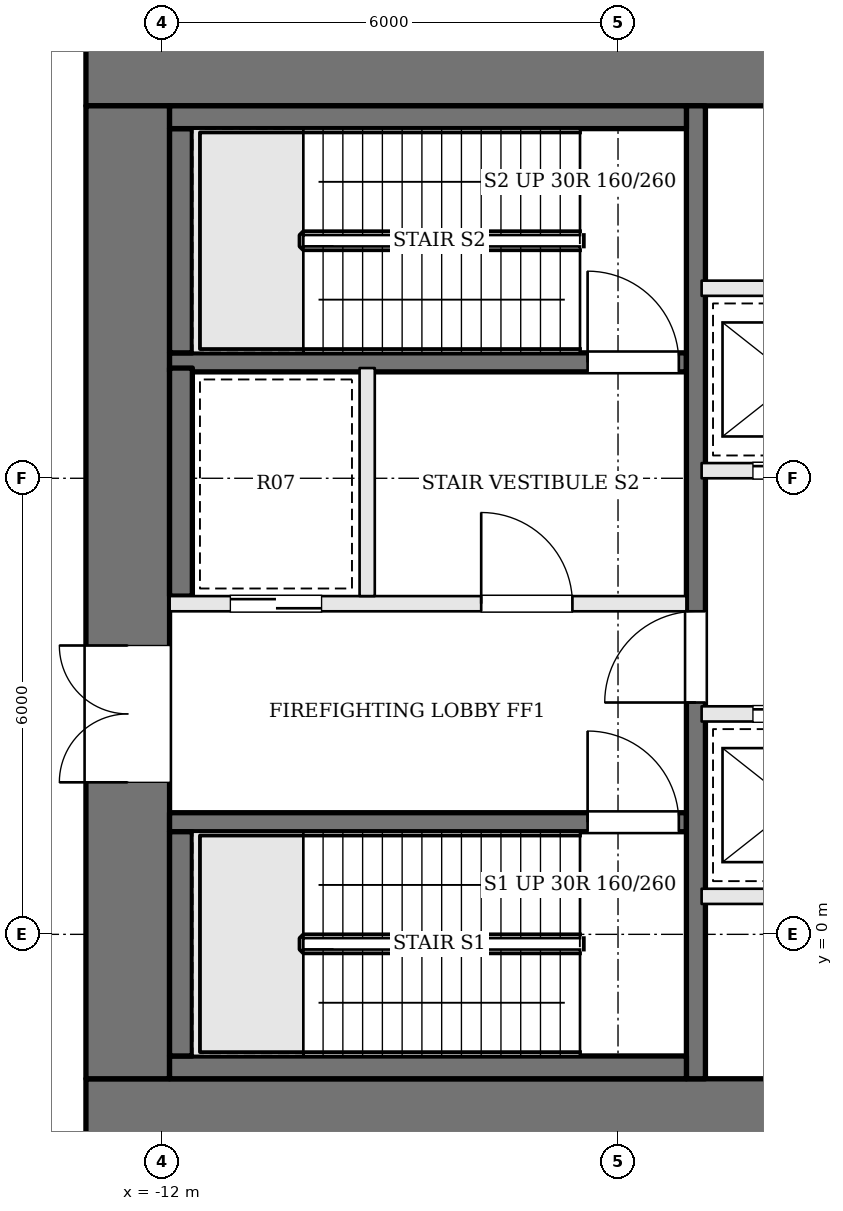
"""IFC4 building model, lengths in metres.
Left out: names, types, materials, properties, quantities, classifications, styles, units other than length and angle.
Written with IfcOpenShell. Run it as: python <this file> out.ifc"""

import sys

from ifc_helpers import new_model, si_unit, direction, frame, frame_2d, origin, place, context, subcontext, project, spatial, rectangle, extrude, element, fill, save


model = new_model("IFC4")
c1 = context("Model", 3, precision=1e-05, world=origin(), true_north=direction((0.0, 1.0)))
c2 = subcontext(c1, "Body", "Model", "MODEL_VIEW")
j1 = project(units=[si_unit("LENGTHUNIT", "METRE"), si_unit("PLANEANGLEUNIT", "RADIAN")], contexts=[c1])
p1 = place(None, origin())
s1 = spatial("IfcSite", under=j1, at=p1, CompositionType="ELEMENT")
p2 = place(p1, origin())
s2 = spatial("IfcBuilding", under=s1, at=p2, CompositionType="ELEMENT")
p3 = place(p2, frame((0.0, 0.0, 125.7)))
s3 = spatial("IfcBuildingStorey", under=s2, at=p3, CompositionType="ELEMENT", Elevation=125.7)
p4 = place(p3, frame((-13.0, 11.45, 0.0), z_axis=(0.0, 0.0, 1.0), x_axis=(1.0, 0.0, 0.0)))
e1 = element("IfcWall", 1, at=p4, inside=s3, PredefinedType="SHEAR", context=c2, shape_type="SweptSolid", body=[
    extrude(rectangle(XDim=26.0, YDim=1.1, at=frame_2d((13.0, 0.0))), origin(), (0.0, 0.0, 1.0), 4.8),
])
p5 = place(p4, frame((9.375, 0.0, 0.0)))
e2 = element("IfcOpeningElement", 2, at=p5, cuts=e1, PredefinedType="OPENING", context=c2, shape_type="SweptSolid", body=[
    extrude(rectangle(XDim=0.7, YDim=2.1, at=frame_2d((0.35, 1.05))), frame((0.0, 0.56, 0.0), z_axis=(0.0, -1.0, 0.0), x_axis=(1.0, 0.0, 0.0)), (0.0, 0.0, 1.0), 1.12),
])
p6 = place(p4, frame((11.825, 0.0, 0.0)))
e3 = element("IfcOpeningElement", 3, at=p6, cuts=e1, PredefinedType="OPENING", context=c2, shape_type="SweptSolid", body=[
    extrude(rectangle(XDim=0.7, YDim=2.1, at=frame_2d((0.35, 1.05))), frame((0.0, 0.56, 0.0), z_axis=(0.0, -1.0, 0.0), x_axis=(1.0, 0.0, 0.0)), (0.0, 0.0, 1.0), 1.12),
])
p7 = place(p4, frame((13.725, 0.0, 0.0)))
e4 = element("IfcOpeningElement", 4, at=p7, cuts=e1, PredefinedType="OPENING", context=c2, shape_type="SweptSolid", body=[
    extrude(rectangle(XDim=1.0, YDim=2.1, at=frame_2d((0.5, 1.05))), frame((0.0, 0.56, 0.0), z_axis=(0.0, -1.0, 0.0), x_axis=(1.0, 0.0, 0.0)), (0.0, 0.0, 1.0), 1.12),
])
p8 = place(p4, frame((16.175, 0.0, 0.0)))
e5 = element("IfcOpeningElement", 5, at=p8, cuts=e1, PredefinedType="OPENING", context=c2, shape_type="SweptSolid", body=[
    extrude(rectangle(XDim=1.0, YDim=2.1, at=frame_2d((0.5, 1.05))), frame((0.0, 0.56, 0.0), z_axis=(0.0, -1.0, 0.0), x_axis=(1.0, 0.0, 0.0)), (0.0, 0.0, 1.0), 1.12),
])
p9 = place(p3, frame((-13.0, -2.45, 0.0), z_axis=(0.0, 0.0, 1.0), x_axis=(1.0, 0.0, 0.0)))
e6 = element("IfcWall", 6, at=p9, inside=s3, PredefinedType="SHEAR", context=c2, shape_type="SweptSolid", body=[
    extrude(rectangle(XDim=26.0, YDim=1.1, at=frame_2d((13.0, 0.0))), origin(), (0.0, 0.0, 1.0), 4.8),
])
p10 = place(p9, frame((9.275, 0.0, 0.0)))
e7 = element("IfcOpeningElement", 7, at=p10, cuts=e6, PredefinedType="OPENING", context=c2, shape_type="SweptSolid", body=[
    extrude(rectangle(XDim=0.9, YDim=2.1, at=frame_2d((0.45, 1.05))), frame((0.0, 0.56, 0.0), z_axis=(0.0, -1.0, 0.0), x_axis=(1.0, 0.0, 0.0)), (0.0, 0.0, 1.0), 1.12),
])
p11 = place(p9, frame((12.525, 0.0, 0.0)))
e8 = element("IfcOpeningElement", 8, at=p11, cuts=e6, PredefinedType="OPENING", context=c2, shape_type="SweptSolid", body=[
    extrude(rectangle(XDim=0.9, YDim=2.1, at=frame_2d((0.45, 1.05))), frame((0.0, 0.56, 0.0), z_axis=(0.0, -1.0, 0.0), x_axis=(1.0, 0.0, 0.0)), (0.0, 0.0, 1.0), 1.12),
])
p12 = place(p9, frame((15.0, 0.0, 0.0)))
e9 = element("IfcOpeningElement", 9, at=p12, cuts=e6, PredefinedType="OPENING", context=c2, shape_type="SweptSolid", body=[
    extrude(rectangle(XDim=1.0, YDim=2.1, at=frame_2d((0.5, 1.05))), frame((0.0, 0.56, 0.0), z_axis=(0.0, -1.0, 0.0), x_axis=(1.0, 0.0, 0.0)), (0.0, 0.0, 1.0), 1.12),
])
p13 = place(p9, frame((16.7, 0.0, 0.0)))
e10 = element("IfcOpeningElement", 10, at=p13, cuts=e6, PredefinedType="OPENING", context=c2, shape_type="SweptSolid", body=[
    extrude(rectangle(XDim=0.9, YDim=2.1, at=frame_2d((0.45, 1.05))), frame((0.0, 0.56, 0.0), z_axis=(0.0, -1.0, 0.0), x_axis=(1.0, 0.0, 0.0)), (0.0, 0.0, 1.0), 1.12),
])
p14 = place(p3, frame((-12.45, -1.9, 0.0), z_axis=(0.0, 0.0, 1.0), x_axis=(0.0, 1.0, 0.0)))
e11 = element("IfcWall", 11, at=p14, inside=s3, PredefinedType="SHEAR", context=c2, shape_type="SweptSolid", body=[
    extrude(rectangle(XDim=12.8, YDim=1.1, at=frame_2d((6.4, 0.0))), origin(), (0.0, 0.0, 1.0), 4.8),
])
p15 = place(p14, frame((3.9, 0.0, 0.0)))
e12 = element("IfcOpeningElement", 12, at=p15, cuts=e11, PredefinedType="OPENING", context=c2, shape_type="SweptSolid", body=[
    extrude(rectangle(XDim=1.8, YDim=2.1, at=frame_2d((0.9, 1.05))), frame((0.0, 0.56, 0.0), z_axis=(0.0, -1.0, 0.0), x_axis=(1.0, 0.0, 0.0)), (0.0, 0.0, 1.0), 1.12),
])
p16 = place(p3, frame((-11.9, 1.475, 0.0), z_axis=(0.0, 0.0, 1.0), x_axis=(1.0, 0.0, 0.0)))
e13 = element("IfcWall", 13, at=p16, inside=s3, PredefinedType="SOLIDWALL", context=c2, shape_type="SweptSolid", body=[
    extrude(rectangle(XDim=6.8, YDim=0.25, at=frame_2d((3.4, 0.0))), origin(), (0.0, 0.0, 1.0), 4.6),
])
p17 = place(p16, frame((5.5, 0.0, 0.0)))
e14 = element("IfcOpeningElement", 14, at=p17, cuts=e13, PredefinedType="OPENING", context=c2, shape_type="SweptSolid", body=[
    extrude(rectangle(XDim=1.2, YDim=2.1, at=frame_2d((0.6, 1.05))), frame((0.0, 0.135, 0.0), z_axis=(0.0, -1.0, 0.0), x_axis=(1.0, 0.0, 0.0)), (0.0, 0.0, 1.0), 0.27),
])
p18 = place(p3, frame((-11.9, 4.35, 0.0), z_axis=(0.0, 0.0, 1.0), x_axis=(1.0, 0.0, 0.0)))
e15 = element("IfcWall", 15, at=p18, inside=s3, PredefinedType="SOLIDWALL", context=c2, shape_type="SweptSolid", body=[
    extrude(rectangle(XDim=6.8, YDim=0.2, at=frame_2d((3.4, 0.0))), origin(), (0.0, 0.0, 1.0), 4.6),
])
p19 = place(p18, frame((4.1, 0.0, 0.0)))
e16 = element("IfcOpeningElement", 16, at=p19, cuts=e15, PredefinedType="OPENING", context=c2, shape_type="SweptSolid", body=[
    extrude(rectangle(XDim=1.2, YDim=2.1, at=frame_2d((0.6, 1.05))), frame((0.0, 0.11, 0.0), z_axis=(0.0, -1.0, 0.0), x_axis=(1.0, 0.0, 0.0)), (0.0, 0.0, 1.0), 0.22),
])
p20 = place(p18, frame((0.8, 0.0, 0.0)))
e17 = element("IfcOpeningElement", 17, at=p20, cuts=e15, PredefinedType="OPENING", context=c2, shape_type="SweptSolid", body=[
    extrude(rectangle(XDim=1.2, YDim=2.1, at=frame_2d((0.6, 1.05))), frame((0.0, 0.11, 0.0), z_axis=(0.0, -1.0, 0.0), x_axis=(1.0, 0.0, 0.0)), (0.0, 0.0, 1.0), 0.22),
])
p21 = place(p3, frame((-11.9, 7.525, 0.0), z_axis=(0.0, 0.0, 1.0), x_axis=(1.0, 0.0, 0.0)))
e18 = element("IfcWall", 18, at=p21, inside=s3, PredefinedType="SOLIDWALL", context=c2, shape_type="SweptSolid", body=[
    extrude(rectangle(XDim=6.8, YDim=0.25, at=frame_2d((3.4, 0.0))), origin(), (0.0, 0.0, 1.0), 4.6),
])
p22 = place(p21, frame((5.5, 0.0, 0.0)))
e19 = element("IfcOpeningElement", 19, at=p22, cuts=e18, PredefinedType="OPENING", context=c2, shape_type="SweptSolid", body=[
    extrude(rectangle(XDim=1.2, YDim=2.1, at=frame_2d((0.6, 1.05))), frame((0.0, 0.135, 0.0), z_axis=(0.0, -1.0, 0.0), x_axis=(1.0, 0.0, 0.0)), (0.0, 0.0, 1.0), 0.27),
])
p23 = place(p3, frame((-9.3, 4.45, 0.0), z_axis=(0.0, 0.0, 1.0), x_axis=(0.0, 1.0, 0.0)))
e20 = element("IfcWall", 20, at=p23, inside=s3, PredefinedType="SOLIDWALL", context=c2, shape_type="SweptSolid", body=[
    extrude(rectangle(XDim=3.0, YDim=0.2, at=frame_2d((1.5, 0.0))), origin(), (0.0, 0.0, 1.0), 4.6),
])
p24 = place(p3, frame((-4.975, -1.9, 0.0), z_axis=(0.0, 0.0, 1.0), x_axis=(0.0, 1.0, 0.0)))
e21 = element("IfcWall", 21, at=p24, inside=s3, PredefinedType="SOLIDWALL", context=c2, shape_type="SweptSolid", body=[
    extrude(rectangle(XDim=12.8, YDim=0.25, at=frame_2d((6.4, 0.0))), origin(), (0.0, 0.0, 1.0), 4.6),
])
p25 = place(p24, frame((4.95, 0.0, 0.0)))
e22 = element("IfcOpeningElement", 22, at=p25, cuts=e21, PredefinedType="OPENING", context=c2, shape_type="SweptSolid", body=[
    extrude(rectangle(XDim=1.2, YDim=2.1, at=frame_2d((0.6, 1.05))), frame((0.0, 0.135, 0.0), z_axis=(0.0, -1.0, 0.0), x_axis=(1.0, 0.0, 0.0)), (0.0, 0.0, 1.0), 0.27),
])
p26 = place(p3, frame((-11.9, -1.75, 0.0), z_axis=(0.0, 0.0, 1.0), x_axis=(1.0, 0.0, 0.0)))
e23 = element("IfcWall", 23, at=p26, inside=s3, PredefinedType="SOLIDWALL", context=c2, shape_type="SweptSolid", body=[
    extrude(rectangle(XDim=6.8, YDim=0.3, at=frame_2d((3.4, 0.0))), origin(), (0.0, 0.0, 1.0), 4.6),
])
p27 = place(p3, frame((-11.75, -1.6, 0.0), z_axis=(0.0, 0.0, 1.0), x_axis=(0.0, 1.0, 0.0)))
e24 = element("IfcWall", 24, at=p27, inside=s3, PredefinedType="SOLIDWALL", context=c2, shape_type="SweptSolid", body=[
    extrude(rectangle(XDim=2.95, YDim=0.3, at=frame_2d((1.475, 0.0))), origin(), (0.0, 0.0, 1.0), 4.6),
])
p28 = place(p3, frame((-11.75, 4.45, 0.0), z_axis=(0.0, 0.0, 1.0), x_axis=(0.0, 1.0, 0.0)))
e25 = element("IfcWall", 25, at=p28, inside=s3, PredefinedType="SOLIDWALL", context=c2, shape_type="SweptSolid", body=[
    extrude(rectangle(XDim=3.0, YDim=0.3, at=frame_2d((1.5, 0.0))), origin(), (0.0, 0.0, 1.0), 4.6),
])
p29 = place(p3, frame((-11.75, 7.65, 0.0), z_axis=(0.0, 0.0, 1.0), x_axis=(0.0, 1.0, 0.0)))
e26 = element("IfcWall", 26, at=p29, inside=s3, PredefinedType="SOLIDWALL", context=c2, shape_type="SweptSolid", body=[
    extrude(rectangle(XDim=2.95, YDim=0.3, at=frame_2d((1.475, 0.0))), origin(), (0.0, 0.0, 1.0), 4.6),
])
p30 = place(p3, frame((-11.9, 10.75, 0.0), z_axis=(0.0, 0.0, 1.0), x_axis=(1.0, 0.0, 0.0)))
e27 = element("IfcWall", 27, at=p30, inside=s3, PredefinedType="SOLIDWALL", context=c2, shape_type="SweptSolid", body=[
    extrude(rectangle(XDim=6.8, YDim=0.3, at=frame_2d((3.4, 0.0))), origin(), (0.0, 0.0, 1.0), 4.6),
])
p31 = place(p3, frame((-4.9, 0.5, 0.0), z_axis=(0.0, 0.0, 1.0), x_axis=(1.0, 0.0, 0.0)))
e28 = element("IfcWall", 28, at=p31, inside=s3, PredefinedType="SOLIDWALL", context=c2, shape_type="SweptSolid", body=[
    extrude(rectangle(XDim=9.8, YDim=0.2, at=frame_2d((4.9, 0.0))), origin(), (0.0, 0.0, 1.0), 4.6),
])
p32 = place(p3, frame((-4.9, 2.9, 0.0), z_axis=(0.0, 0.0, 1.0), x_axis=(1.0, 0.0, 0.0)))
e29 = element("IfcWall", 29, at=p32, inside=s3, PredefinedType="SOLIDWALL", context=c2, shape_type="SweptSolid", body=[
    extrude(rectangle(XDim=9.8, YDim=0.2, at=frame_2d((4.9, 0.0))), origin(), (0.0, 0.0, 1.0), 4.6),
])
p33 = place(p32, frame((0.675, 0.0, 0.0)))
e30 = element("IfcOpeningElement", 30, at=p33, cuts=e29, PredefinedType="OPENING", context=c2, shape_type="SweptSolid", body=[
    extrude(rectangle(XDim=1.1, YDim=2.1, at=frame_2d((0.55, 1.05))), frame((0.0, 0.11, 0.0), z_axis=(0.0, -1.0, 0.0), x_axis=(1.0, 0.0, 0.0)), (0.0, 0.0, 1.0), 0.22),
])
p34 = place(p32, frame((3.175, 0.0, 0.0)))
e31 = element("IfcOpeningElement", 31, at=p34, cuts=e29, PredefinedType="OPENING", context=c2, shape_type="SweptSolid", body=[
    extrude(rectangle(XDim=1.0, YDim=2.1, at=frame_2d((0.5, 1.05))), frame((0.0, 0.11, 0.0), z_axis=(0.0, -1.0, 0.0), x_axis=(1.0, 0.0, 0.0)), (0.0, 0.0, 1.0), 0.22),
])
p35 = place(p32, frame((5.575, 0.0, 0.0)))
e32 = element("IfcOpeningElement", 32, at=p35, cuts=e29, PredefinedType="OPENING", context=c2, shape_type="SweptSolid", body=[
    extrude(rectangle(XDim=1.1, YDim=2.1, at=frame_2d((0.55, 1.05))), frame((0.0, 0.11, 0.0), z_axis=(0.0, -1.0, 0.0), x_axis=(1.0, 0.0, 0.0)), (0.0, 0.0, 1.0), 0.22),
])
p36 = place(p32, frame((8.025, 0.0, 0.0)))
e33 = element("IfcOpeningElement", 33, at=p36, cuts=e29, PredefinedType="OPENING", context=c2, shape_type="SweptSolid", body=[
    extrude(rectangle(XDim=1.1, YDim=2.1, at=frame_2d((0.55, 1.05))), frame((0.0, 0.11, 0.0), z_axis=(0.0, -1.0, 0.0), x_axis=(1.0, 0.0, 0.0)), (0.0, 0.0, 1.0), 0.22),
])
p37 = place(p3, frame((-4.9, 6.1, 0.0), z_axis=(0.0, 0.0, 1.0), x_axis=(1.0, 0.0, 0.0)))
e34 = element("IfcWall", 34, at=p37, inside=s3, PredefinedType="SOLIDWALL", context=c2, shape_type="SweptSolid", body=[
    extrude(rectangle(XDim=9.8, YDim=0.2, at=frame_2d((4.9, 0.0))), origin(), (0.0, 0.0, 1.0), 4.6),
])
p38 = place(p37, frame((0.675, 0.0, 0.0)))
e35 = element("IfcOpeningElement", 35, at=p38, cuts=e34, PredefinedType="OPENING", context=c2, shape_type="SweptSolid", body=[
    extrude(rectangle(XDim=1.1, YDim=2.1, at=frame_2d((0.55, 1.05))), frame((0.0, 0.11, 0.0), z_axis=(0.0, -1.0, 0.0), x_axis=(1.0, 0.0, 0.0)), (0.0, 0.0, 1.0), 0.22),
])
p39 = place(p37, frame((3.125, 0.0, 0.0)))
e36 = element("IfcOpeningElement", 36, at=p39, cuts=e34, PredefinedType="OPENING", context=c2, shape_type="SweptSolid", body=[
    extrude(rectangle(XDim=1.1, YDim=2.1, at=frame_2d((0.55, 1.05))), frame((0.0, 0.11, 0.0), z_axis=(0.0, -1.0, 0.0), x_axis=(1.0, 0.0, 0.0)), (0.0, 0.0, 1.0), 0.22),
])
p40 = place(p37, frame((5.575, 0.0, 0.0)))
e37 = element("IfcOpeningElement", 37, at=p40, cuts=e34, PredefinedType="OPENING", context=c2, shape_type="SweptSolid", body=[
    extrude(rectangle(XDim=1.1, YDim=2.1, at=frame_2d((0.55, 1.05))), frame((0.0, 0.11, 0.0), z_axis=(0.0, -1.0, 0.0), x_axis=(1.0, 0.0, 0.0)), (0.0, 0.0, 1.0), 0.22),
])
p41 = place(p37, frame((8.025, 0.0, 0.0)))
e38 = element("IfcOpeningElement", 38, at=p41, cuts=e34, PredefinedType="OPENING", context=c2, shape_type="SweptSolid", body=[
    extrude(rectangle(XDim=1.1, YDim=2.1, at=frame_2d((0.55, 1.05))), frame((0.0, 0.11, 0.0), z_axis=(0.0, -1.0, 0.0), x_axis=(1.0, 0.0, 0.0)), (0.0, 0.0, 1.0), 0.22),
])
p42 = place(p3, frame((-4.9, 8.5, 0.0), z_axis=(0.0, 0.0, 1.0), x_axis=(1.0, 0.0, 0.0)))
e39 = element("IfcWall", 39, at=p42, inside=s3, PredefinedType="SOLIDWALL", context=c2, shape_type="SweptSolid", body=[
    extrude(rectangle(XDim=9.8, YDim=0.2, at=frame_2d((4.9, 0.0))), origin(), (0.0, 0.0, 1.0), 4.6),
])
p43 = place(p15, origin())
e40 = element("IfcDoor", 40, at=p43, inside=s3, OperationType="DOUBLE_DOOR_SINGLE_SWING", PredefinedType="DOOR", context=c2, shape_type="SweptSolid", body=[
    extrude(rectangle(XDim=1.8, YDim=2.1, at=frame_2d((0.9, 1.05))), frame((0.0, 0.025, 0.0), z_axis=(0.0, -1.0, 0.0), x_axis=(1.0, 0.0, 0.0)), (0.0, 0.0, 1.0), 0.05),
])
fill(e12, e40)
p44 = place(p25, origin())
e41 = element("IfcDoor", 41, at=p44, inside=s3, OperationType="SINGLE_SWING_LEFT", PredefinedType="DOOR", context=c2, shape_type="SweptSolid", body=[
    extrude(rectangle(XDim=1.2, YDim=2.1, at=frame_2d((0.6, 1.05))), frame((0.0, 0.025, 0.0), z_axis=(0.0, -1.0, 0.0), x_axis=(1.0, 0.0, 0.0)), (0.0, 0.0, 1.0), 0.05),
])
fill(e22, e41)
p45 = place(p19, origin())
e42 = element("IfcDoor", 42, at=p45, inside=s3, OperationType="SINGLE_SWING_LEFT", PredefinedType="DOOR", context=c2, shape_type="SweptSolid", body=[
    extrude(rectangle(XDim=1.2, YDim=2.1, at=frame_2d((0.6, 1.05))), frame((0.0, 0.025, 0.0), z_axis=(0.0, -1.0, 0.0), x_axis=(1.0, 0.0, 0.0)), (0.0, 0.0, 1.0), 0.05),
])
fill(e16, e42)
p46 = place(p17, origin())
e43 = element("IfcDoor", 43, at=p46, inside=s3, OperationType="SINGLE_SWING_LEFT", PredefinedType="DOOR", context=c2, shape_type="SweptSolid", body=[
    extrude(rectangle(XDim=1.2, YDim=2.1, at=frame_2d((0.6, 1.05))), frame((0.0, 0.025, 0.0), z_axis=(0.0, -1.0, 0.0), x_axis=(1.0, 0.0, 0.0)), (0.0, 0.0, 1.0), 0.05),
])
fill(e14, e43)
p47 = place(p22, origin())
e44 = element("IfcDoor", 44, at=p47, inside=s3, OperationType="SINGLE_SWING_LEFT", PredefinedType="DOOR", context=c2, shape_type="SweptSolid", body=[
    extrude(rectangle(XDim=1.2, YDim=2.1, at=frame_2d((0.6, 1.05))), frame((0.0, 0.025, 0.0), z_axis=(0.0, -1.0, 0.0), x_axis=(1.0, 0.0, 0.0)), (0.0, 0.0, 1.0), 0.05),
])
fill(e19, e44)
p48 = place(p20, origin())
e45 = element("IfcDoor", 45, at=p48, inside=s3, OperationType="SLIDING_TO_RIGHT", PredefinedType="DOOR", context=c2, shape_type="SweptSolid", body=[
    extrude(rectangle(XDim=1.2, YDim=2.1, at=frame_2d((0.6, 1.05))), frame((0.0, 0.025, 0.0), z_axis=(0.0, -1.0, 0.0), x_axis=(1.0, 0.0, 0.0)), (0.0, 0.0, 1.0), 0.05),
])
fill(e17, e45)
p49 = place(p33, origin())
e46 = element("IfcDoor", 46, at=p49, inside=s3, OperationType="SLIDING_TO_RIGHT", PredefinedType="DOOR", context=c2, shape_type="SweptSolid", body=[
    extrude(rectangle(XDim=1.1, YDim=2.1, at=frame_2d((0.55, 1.05))), frame((0.0, 0.025, 0.0), z_axis=(0.0, -1.0, 0.0), x_axis=(1.0, 0.0, 0.0)), (0.0, 0.0, 1.0), 0.05),
])
fill(e30, e46)
p50 = place(p38, origin())
e47 = element("IfcDoor", 47, at=p50, inside=s3, OperationType="SLIDING_TO_RIGHT", PredefinedType="DOOR", context=c2, shape_type="SweptSolid", body=[
    extrude(rectangle(XDim=1.1, YDim=2.1, at=frame_2d((0.55, 1.05))), frame((0.0, 0.025, 0.0), z_axis=(0.0, -1.0, 0.0), x_axis=(1.0, 0.0, 0.0)), (0.0, 0.0, 1.0), 0.05),
])
fill(e35, e47)
save(model, sys.argv[1])
